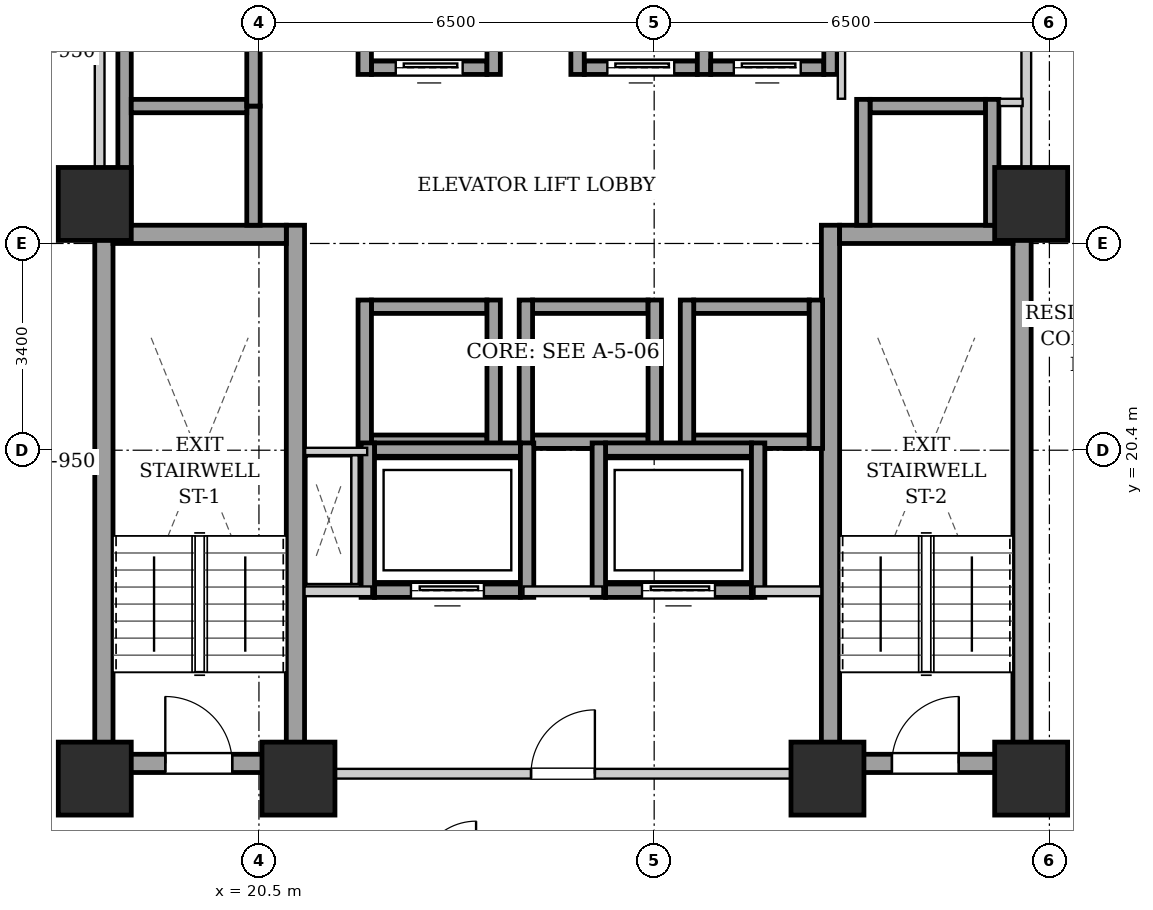
"""IFC4 building model, lengths in metres.
Left out: names, types, materials, properties, quantities, classifications, styles, units other than length and angle.
Written with IfcOpenShell. Run it as: python <this file> out.ifc"""

import sys

from ifc_helpers import new_model, si_unit, direction, frame, frame_2d, origin, origin_2d, place, context, subcontext, project, spatial, rectangle, extrude, element, fill, save


model = new_model("IFC4")
c1 = context("Model", 3, precision=1e-05, world=origin(), true_north=direction((0.0, 1.0)))
c2 = subcontext(c1, "Body", "Model", "MODEL_VIEW")
j1 = project(units=[si_unit("LENGTHUNIT", "METRE"), si_unit("PLANEANGLEUNIT", "RADIAN")], contexts=[c1])
p1 = place(None, origin())
s1 = spatial("IfcSite", under=j1, at=p1, CompositionType="ELEMENT")
p2 = place(p1, origin())
s2 = spatial("IfcBuilding", under=s1, at=p2, CompositionType="ELEMENT")
p3 = place(p2, frame((0.0, 0.0, 64.2)))
s3 = spatial("IfcBuildingStorey", under=s2, at=p3, CompositionType="ELEMENT", Elevation=64.2)
for number, where, z_axis, x_axis in (
    (1, (17.8, 15.0, 0.0), (0.0, 0.0, 1.0), (1.0, 0.0, 0.0)),
    (2, (21.15, 15.0, 0.0), (0.0, 0.0, 1.0), (1.0, 0.0, 0.0)),
    (3, (29.85, 15.0, 0.0), (0.0, 0.0, 1.0), (1.0, 0.0, 0.0)),
    (4, (33.2, 15.0, 0.0), (0.0, 0.0, 1.0), (1.0, 0.0, 0.0)),
    (5, (17.8, 24.45, 0.0), (0.0, 0.0, 1.0), (1.0, 0.0, 0.0)),
    (6, (33.2, 24.45, 0.0), (0.0, 0.0, 1.0), (1.0, 0.0, 0.0)),
):
    element("IfcColumn", number, at=place(p3, frame(where, z_axis=z_axis, x_axis=x_axis)), inside=s3, PredefinedType="COLUMN", context=c2, shape_type="SweptSolid", body=[
        extrude(rectangle(XDim=1.2, YDim=1.2, at=origin_2d()), origin(), (0.0, 0.0, 1.0), 3.2),
    ])
for number, where, z_axis, x_axis in (
    (7, (17.95, 15.1, 0.0), (0.0, 0.0, 1.0), (0.0, 1.0, 0.0)),
    (8, (21.1, 15.1, 0.0), (0.0, 0.0, 1.0), (0.0, 1.0, 0.0)),
):
    element("IfcWall", number, at=place(p3, frame(where, z_axis=z_axis, x_axis=x_axis)), inside=s3, PredefinedType="SHEAR", context=c2, shape_type="SweptSolid", body=[
        extrude(rectangle(XDim=9.0, YDim=0.3, at=frame_2d((4.5, 0.0))), origin(), (0.0, 0.0, 1.0), 2.94),
    ])
p4 = place(p3, frame((18.1, 23.95, 0.0), z_axis=(0.0, 0.0, 1.0), x_axis=(1.0, 0.0, 0.0)))
e9 = element("IfcWall", 9, at=p4, inside=s3, PredefinedType="SHEAR", context=c2, shape_type="SweptSolid", body=[
    extrude(rectangle(XDim=2.85, YDim=0.3, at=frame_2d((1.425, 0.0))), origin(), (0.0, 0.0, 1.0), 2.94),
])
p5 = place(p3, frame((18.1, 15.25, 0.0), z_axis=(0.0, 0.0, 1.0), x_axis=(1.0, 0.0, 0.0)))
e10 = element("IfcWall", 10, at=p5, inside=s3, PredefinedType="SHEAR", context=c2, shape_type="SweptSolid", body=[
    extrude(rectangle(XDim=2.85, YDim=0.3, at=frame_2d((1.425, 0.0))), origin(), (0.0, 0.0, 1.0), 2.94),
])
p6 = place(p5, frame((0.86, 0.0, 0.0)))
e11 = element("IfcOpeningElement", 11, at=p6, cuts=e10, PredefinedType="OPENING", context=c2, shape_type="SweptSolid", body=[
    extrude(rectangle(XDim=1.1, YDim=2.05, at=frame_2d((0.55, 1.025))), frame((0.0, 0.16, 0.0), z_axis=(0.0, -1.0, 0.0), x_axis=(1.0, 0.0, 0.0)), (0.0, 0.0, 1.0), 0.32),
])
for number, where, z_axis, x_axis in (
    (12, (29.9, 15.1, 0.0), (0.0, 0.0, 1.0), (0.0, 1.0, 0.0)),
    (13, (33.05, 15.1, 0.0), (0.0, 0.0, 1.0), (0.0, 1.0, 0.0)),
):
    element("IfcWall", number, at=place(p3, frame(where, z_axis=z_axis, x_axis=x_axis)), inside=s3, PredefinedType="SHEAR", context=c2, shape_type="SweptSolid", body=[
        extrude(rectangle(XDim=9.0, YDim=0.3, at=frame_2d((4.5, 0.0))), origin(), (0.0, 0.0, 1.0), 2.94),
    ])
p7 = place(p3, frame((30.05, 23.95, 0.0), z_axis=(0.0, 0.0, 1.0), x_axis=(1.0, 0.0, 0.0)))
e14 = element("IfcWall", 14, at=p7, inside=s3, PredefinedType="SHEAR", context=c2, shape_type="SweptSolid", body=[
    extrude(rectangle(XDim=2.85, YDim=0.3, at=frame_2d((1.425, 0.0))), origin(), (0.0, 0.0, 1.0), 2.94),
])
p8 = place(p3, frame((30.05, 15.25, 0.0), z_axis=(0.0, 0.0, 1.0), x_axis=(1.0, 0.0, 0.0)))
e15 = element("IfcWall", 15, at=p8, inside=s3, PredefinedType="SHEAR", context=c2, shape_type="SweptSolid", body=[
    extrude(rectangle(XDim=2.85, YDim=0.3, at=frame_2d((1.425, 0.0))), origin(), (0.0, 0.0, 1.0), 2.94),
])
p9 = place(p8, frame((0.86, 0.0, 0.0)))
e16 = element("IfcOpeningElement", 16, at=p9, cuts=e15, PredefinedType="OPENING", context=c2, shape_type="SweptSolid", body=[
    extrude(rectangle(XDim=1.1, YDim=2.05, at=frame_2d((0.55, 1.025))), frame((0.0, 0.16, 0.0), z_axis=(0.0, -1.0, 0.0), x_axis=(1.0, 0.0, 0.0)), (0.0, 0.0, 1.0), 0.32),
])
p10 = place(p3, frame((22.35, 26.69, 0.0), z_axis=(0.0, 0.0, 1.0), x_axis=(1.0, 0.0, 0.0)))
e17 = element("IfcWall", 17, at=p10, inside=s3, PredefinedType="SHEAR", context=c2, shape_type="SweptSolid", body=[
    extrude(rectangle(XDim=1.9, YDim=0.22, at=frame_2d((0.95, 0.0))), origin(), (0.0, 0.0, 1.0), 2.94),
])
p11 = place(p10, frame((0.4, 0.0, 0.0)))
e18 = element("IfcOpeningElement", 18, at=p11, cuts=e17, PredefinedType="OPENING", context=c2, shape_type="SweptSolid", body=[
    extrude(rectangle(XDim=1.1, YDim=2.15, at=frame_2d((0.55, 1.075))), frame((0.0, 0.12, 0.0), z_axis=(0.0, -1.0, 0.0), x_axis=(1.0, 0.0, 0.0)), (0.0, 0.0, 1.0), 0.24),
])
for number, where, z_axis, x_axis in (
    (19, (22.24, 26.58, 0.0), (0.0, 0.0, 1.0), (0.0, 1.0, 0.0)),
    (20, (24.36, 26.58, 0.0), (0.0, 0.0, 1.0), (0.0, 1.0, 0.0)),
):
    element("IfcWall", number, at=place(p3, frame(where, z_axis=z_axis, x_axis=x_axis)), inside=s3, PredefinedType="SHEAR", context=c2, shape_type="SweptSolid", body=[
        extrude(rectangle(XDim=2.44, YDim=0.22, at=frame_2d((1.22, 0.0))), origin(), (0.0, 0.0, 1.0), 2.94),
    ])
p12 = place(p3, frame((25.85, 26.69, 0.0), z_axis=(0.0, 0.0, 1.0), x_axis=(1.0, 0.0, 0.0)))
e21 = element("IfcWall", 21, at=p12, inside=s3, PredefinedType="SHEAR", context=c2, shape_type="SweptSolid", body=[
    extrude(rectangle(XDim=1.86, YDim=0.22, at=frame_2d((0.93, 0.0))), origin(), (0.0, 0.0, 1.0), 2.94),
])
p13 = place(p12, frame((0.38, 0.0, 0.0)))
e22 = element("IfcOpeningElement", 22, at=p13, cuts=e21, PredefinedType="OPENING", context=c2, shape_type="SweptSolid", body=[
    extrude(rectangle(XDim=1.1, YDim=2.15, at=frame_2d((0.55, 1.075))), frame((0.0, 0.12, 0.0), z_axis=(0.0, -1.0, 0.0), x_axis=(1.0, 0.0, 0.0)), (0.0, 0.0, 1.0), 0.24),
])
for number, where, z_axis, x_axis in (
    (23, (25.74, 26.58, 0.0), (0.0, 0.0, 1.0), (0.0, 1.0, 0.0)),
    (24, (27.82, 26.58, 0.0), (0.0, 0.0, 1.0), (0.0, 1.0, 0.0)),
):
    element("IfcWall", number, at=place(p3, frame(where, z_axis=z_axis, x_axis=x_axis)), inside=s3, PredefinedType="SHEAR", context=c2, shape_type="SweptSolid", body=[
        extrude(rectangle(XDim=2.44, YDim=0.22, at=frame_2d((1.22, 0.0))), origin(), (0.0, 0.0, 1.0), 2.94),
    ])
p14 = place(p3, frame((27.93, 26.69, 0.0), z_axis=(0.0, 0.0, 1.0), x_axis=(1.0, 0.0, 0.0)))
e25 = element("IfcWall", 25, at=p14, inside=s3, PredefinedType="SHEAR", context=c2, shape_type="SweptSolid", body=[
    extrude(rectangle(XDim=1.86, YDim=0.22, at=frame_2d((0.93, 0.0))), origin(), (0.0, 0.0, 1.0), 2.94),
])
p15 = place(p14, frame((0.38, 0.0, 0.0)))
e26 = element("IfcOpeningElement", 26, at=p15, cuts=e25, PredefinedType="OPENING", context=c2, shape_type="SweptSolid", body=[
    extrude(rectangle(XDim=1.1, YDim=2.15, at=frame_2d((0.55, 1.075))), frame((0.0, 0.12, 0.0), z_axis=(0.0, -1.0, 0.0), x_axis=(1.0, 0.0, 0.0)), (0.0, 0.0, 1.0), 0.24),
])
p16 = place(p3, frame((29.9, 26.58, 0.0), z_axis=(0.0, 0.0, 1.0), x_axis=(0.0, 1.0, 0.0)))
e27 = element("IfcWall", 27, at=p16, inside=s3, PredefinedType="SHEAR", context=c2, shape_type="SweptSolid", body=[
    extrude(rectangle(XDim=2.44, YDim=0.22, at=frame_2d((1.22, 0.0))), origin(), (0.0, 0.0, 1.0), 2.94),
])
for number, where, z_axis, x_axis in (
    (28, (22.35, 20.54, 0.0), (0.0, 0.0, 1.0), (1.0, 0.0, 0.0)),
    (29, (22.35, 22.76, 0.0), (0.0, 0.0, 1.0), (1.0, 0.0, 0.0)),
):
    element("IfcWall", number, at=place(p3, frame(where, z_axis=z_axis, x_axis=x_axis)), inside=s3, PredefinedType="SHEAR", context=c2, shape_type="SweptSolid", body=[
        extrude(rectangle(XDim=1.9, YDim=0.22, at=frame_2d((0.95, 0.0))), origin(), (0.0, 0.0, 1.0), 2.94),
    ])
for number, where, z_axis, x_axis in (
    (30, (22.24, 20.43, 0.0), (0.0, 0.0, 1.0), (0.0, 1.0, 0.0)),
    (31, (24.36, 20.43, 0.0), (0.0, 0.0, 1.0), (0.0, 1.0, 0.0)),
):
    element("IfcWall", number, at=place(p3, frame(where, z_axis=z_axis, x_axis=x_axis)), inside=s3, PredefinedType="SHEAR", context=c2, shape_type="SweptSolid", body=[
        extrude(rectangle(XDim=2.44, YDim=0.22, at=frame_2d((1.22, 0.0))), origin(), (0.0, 0.0, 1.0), 2.94),
    ])
for number, where, z_axis, x_axis in (
    (32, (25.0, 20.54, 0.0), (0.0, 0.0, 1.0), (1.0, 0.0, 0.0)),
    (33, (25.0, 22.76, 0.0), (0.0, 0.0, 1.0), (1.0, 0.0, 0.0)),
):
    element("IfcWall", number, at=place(p3, frame(where, z_axis=z_axis, x_axis=x_axis)), inside=s3, PredefinedType="SHEAR", context=c2, shape_type="SweptSolid", body=[
        extrude(rectangle(XDim=1.9, YDim=0.22, at=frame_2d((0.95, 0.0))), origin(), (0.0, 0.0, 1.0), 2.94),
    ])
for number, where, z_axis, x_axis in (
    (34, (24.89, 20.43, 0.0), (0.0, 0.0, 1.0), (0.0, 1.0, 0.0)),
    (35, (27.01, 20.43, 0.0), (0.0, 0.0, 1.0), (0.0, 1.0, 0.0)),
):
    element("IfcWall", number, at=place(p3, frame(where, z_axis=z_axis, x_axis=x_axis)), inside=s3, PredefinedType="SHEAR", context=c2, shape_type="SweptSolid", body=[
        extrude(rectangle(XDim=2.44, YDim=0.22, at=frame_2d((1.22, 0.0))), origin(), (0.0, 0.0, 1.0), 2.94),
    ])
for number, where, z_axis, x_axis in (
    (36, (27.65, 20.54, 0.0), (0.0, 0.0, 1.0), (1.0, 0.0, 0.0)),
    (37, (27.65, 22.76, 0.0), (0.0, 0.0, 1.0), (1.0, 0.0, 0.0)),
):
    element("IfcWall", number, at=place(p3, frame(where, z_axis=z_axis, x_axis=x_axis)), inside=s3, PredefinedType="SHEAR", context=c2, shape_type="SweptSolid", body=[
        extrude(rectangle(XDim=1.9, YDim=0.22, at=frame_2d((0.95, 0.0))), origin(), (0.0, 0.0, 1.0), 2.94),
    ])
for number, where, z_axis, x_axis in (
    (38, (27.54, 20.43, 0.0), (0.0, 0.0, 1.0), (0.0, 1.0, 0.0)),
    (39, (29.66, 20.43, 0.0), (0.0, 0.0, 1.0), (0.0, 1.0, 0.0)),
):
    element("IfcWall", number, at=place(p3, frame(where, z_axis=z_axis, x_axis=x_axis)), inside=s3, PredefinedType="SHEAR", context=c2, shape_type="SweptSolid", body=[
        extrude(rectangle(XDim=2.44, YDim=0.22, at=frame_2d((1.22, 0.0))), origin(), (0.0, 0.0, 1.0), 2.94),
    ])
p17 = place(p3, frame((18.29, 24.1, 0.0), z_axis=(0.0, 0.0, 1.0), x_axis=(0.0, 1.0, 0.0)))
e40 = element("IfcWall", 40, at=p17, inside=s3, PredefinedType="SHEAR", context=c2, shape_type="SweptSolid", body=[
    extrude(rectangle(XDim=4.14, YDim=0.22, at=frame_2d((2.07, 0.0))), origin(), (0.0, 0.0, 1.0), 2.94),
])
p18 = place(p3, frame((20.41, 24.1, 0.0), z_axis=(0.0, 0.0, 1.0), x_axis=(0.0, 1.0, 0.0)))
e41 = element("IfcWall", 41, at=p18, inside=s3, PredefinedType="SHEAR", context=c2, shape_type="SweptSolid", body=[
    extrude(rectangle(XDim=1.96, YDim=0.22, at=frame_2d((0.98, 0.0))), origin(), (0.0, 0.0, 1.0), 2.94),
])
p19 = place(p3, frame((18.4, 26.06, 0.0), z_axis=(0.0, 0.0, 1.0), x_axis=(1.0, 0.0, 0.0)))
e42 = element("IfcWall", 42, at=p19, inside=s3, PredefinedType="SHEAR", context=c2, shape_type="SweptSolid", body=[
    extrude(rectangle(XDim=1.9, YDim=0.22, at=frame_2d((0.95, 0.0))), origin(), (0.0, 0.0, 1.0), 2.94),
])
p20 = place(p3, frame((20.41, 26.06, 0.0), z_axis=(0.0, 0.0, 1.0), x_axis=(0.0, 1.0, 0.0)))
e43 = element("IfcWall", 43, at=p20, inside=s3, PredefinedType="SHEAR", context=c2, shape_type="SweptSolid", body=[
    extrude(rectangle(XDim=2.18, YDim=0.22, at=frame_2d((1.09, 0.0))), origin(), (0.0, 0.0, 1.0), 2.94),
])
p21 = place(p3, frame((30.55, 26.06, 0.0), z_axis=(0.0, 0.0, 1.0), x_axis=(1.0, 0.0, 0.0)))
e44 = element("IfcWall", 44, at=p21, inside=s3, PredefinedType="SHEAR", context=c2, shape_type="SweptSolid", body=[
    extrude(rectangle(XDim=1.9, YDim=0.22, at=frame_2d((0.95, 0.0))), origin(), (0.0, 0.0, 1.0), 2.94),
])
for number, where, z_axis, x_axis in (
    (45, (30.44, 24.1, 0.0), (0.0, 0.0, 1.0), (0.0, 1.0, 0.0)),
    (46, (32.56, 24.1, 0.0), (0.0, 0.0, 1.0), (0.0, 1.0, 0.0)),
):
    element("IfcWall", number, at=place(p3, frame(where, z_axis=z_axis, x_axis=x_axis)), inside=s3, PredefinedType="SHEAR", context=c2, shape_type="SweptSolid", body=[
        extrude(rectangle(XDim=2.07, YDim=0.22, at=frame_2d((1.035, 0.0))), origin(), (0.0, 0.0, 1.0), 2.94),
    ])
p22 = place(p3, frame((22.4, 18.09, 0.0), z_axis=(0.0, 0.0, 1.0), x_axis=(1.0, 0.0, 0.0)))
e47 = element("IfcWall", 47, at=p22, inside=s3, PredefinedType="SHEAR", context=c2, shape_type="SweptSolid", body=[
    extrude(rectangle(XDim=2.4, YDim=0.22, at=frame_2d((1.2, 0.0))), origin(), (0.0, 0.0, 1.0), 2.94),
])
p23 = place(p22, frame((0.6, 0.0, 0.0)))
e48 = element("IfcOpeningElement", 48, at=p23, cuts=e47, PredefinedType="OPENING", context=c2, shape_type="SweptSolid", body=[
    extrude(rectangle(XDim=1.2, YDim=2.15, at=frame_2d((0.6, 1.075))), frame((0.0, 0.12, 0.0), z_axis=(0.0, -1.0, 0.0), x_axis=(1.0, 0.0, 0.0)), (0.0, 0.0, 1.0), 0.24),
])
p24 = place(p3, frame((22.4, 20.41, 0.0), z_axis=(0.0, 0.0, 1.0), x_axis=(1.0, 0.0, 0.0)))
e49 = element("IfcWall", 49, at=p24, inside=s3, PredefinedType="SHEAR", context=c2, shape_type="SweptSolid", body=[
    extrude(rectangle(XDim=2.4, YDim=0.22, at=frame_2d((1.2, 0.0))), origin(), (0.0, 0.0, 1.0), 2.94),
])
for number, where, z_axis, x_axis in (
    (50, (22.29, 17.98, 0.0), (0.0, 0.0, 1.0), (0.0, 1.0, 0.0)),
    (51, (24.91, 17.98, 0.0), (0.0, 0.0, 1.0), (0.0, 1.0, 0.0)),
):
    element("IfcWall", number, at=place(p3, frame(where, z_axis=z_axis, x_axis=x_axis)), inside=s3, PredefinedType="SHEAR", context=c2, shape_type="SweptSolid", body=[
        extrude(rectangle(XDim=2.54, YDim=0.22, at=frame_2d((1.27, 0.0))), origin(), (0.0, 0.0, 1.0), 2.94),
    ])
p25 = place(p3, frame((26.2, 18.09, 0.0), z_axis=(0.0, 0.0, 1.0), x_axis=(1.0, 0.0, 0.0)))
e52 = element("IfcWall", 52, at=p25, inside=s3, PredefinedType="SHEAR", context=c2, shape_type="SweptSolid", body=[
    extrude(rectangle(XDim=2.4, YDim=0.22, at=frame_2d((1.2, 0.0))), origin(), (0.0, 0.0, 1.0), 2.94),
])
p26 = place(p25, frame((0.6, 0.0, 0.0)))
e53 = element("IfcOpeningElement", 53, at=p26, cuts=e52, PredefinedType="OPENING", context=c2, shape_type="SweptSolid", body=[
    extrude(rectangle(XDim=1.2, YDim=2.15, at=frame_2d((0.6, 1.075))), frame((0.0, 0.12, 0.0), z_axis=(0.0, -1.0, 0.0), x_axis=(1.0, 0.0, 0.0)), (0.0, 0.0, 1.0), 0.24),
])
p27 = place(p3, frame((26.2, 20.41, 0.0), z_axis=(0.0, 0.0, 1.0), x_axis=(1.0, 0.0, 0.0)))
e54 = element("IfcWall", 54, at=p27, inside=s3, PredefinedType="SHEAR", context=c2, shape_type="SweptSolid", body=[
    extrude(rectangle(XDim=2.4, YDim=0.22, at=frame_2d((1.2, 0.0))), origin(), (0.0, 0.0, 1.0), 2.94),
])
for number, where, z_axis, x_axis in (
    (55, (26.09, 17.98, 0.0), (0.0, 0.0, 1.0), (0.0, 1.0, 0.0)),
    (56, (28.71, 17.98, 0.0), (0.0, 0.0, 1.0), (0.0, 1.0, 0.0)),
):
    element("IfcWall", number, at=place(p3, frame(where, z_axis=z_axis, x_axis=x_axis)), inside=s3, PredefinedType="SHEAR", context=c2, shape_type="SweptSolid", body=[
        extrude(rectangle(XDim=2.54, YDim=0.22, at=frame_2d((1.27, 0.0))), origin(), (0.0, 0.0, 1.0), 2.94),
    ])
p28 = place(p3, frame((21.25, 15.08, 0.0), z_axis=(0.0, 0.0, 1.0), x_axis=(1.0, 0.0, 0.0)))
e57 = element("IfcWall", 57, at=p28, inside=s3, PredefinedType="PARTITIONING", context=c2, shape_type="SweptSolid", body=[
    extrude(rectangle(XDim=8.5, YDim=0.16, at=frame_2d((4.25, 0.0))), origin(), (0.0, 0.0, 1.0), 2.232),
])
p29 = place(p28, frame((3.725, 0.0, 0.0)))
e58 = element("IfcOpeningElement", 58, at=p29, cuts=e57, PredefinedType="OPENING", context=c2, shape_type="SweptSolid", body=[
    extrude(rectangle(XDim=1.05, YDim=2.05, at=frame_2d((0.525, 1.025))), frame((0.0, 0.09, 0.0), z_axis=(0.0, -1.0, 0.0), x_axis=(1.0, 0.0, 0.0)), (0.0, 0.0, 1.0), 0.18),
])
p30 = place(p3, frame((21.25, 18.08, 0.0), z_axis=(0.0, 0.0, 1.0), x_axis=(1.0, 0.0, 0.0)))
e59 = element("IfcWall", 59, at=p30, inside=s3, PredefinedType="PARTITIONING", context=c2, shape_type="SweptSolid", body=[
    extrude(rectangle(XDim=1.1, YDim=0.16, at=frame_2d((0.55, 0.0))), origin(), (0.0, 0.0, 1.0), 2.94),
])
p31 = place(p3, frame((24.85, 18.08, 0.0), z_axis=(0.0, 0.0, 1.0), x_axis=(1.0, 0.0, 0.0)))
e60 = element("IfcWall", 60, at=p31, inside=s3, PredefinedType="PARTITIONING", context=c2, shape_type="SweptSolid", body=[
    extrude(rectangle(XDim=1.3, YDim=0.16, at=frame_2d((0.65, 0.0))), origin(), (0.0, 0.0, 1.0), 2.94),
])
p32 = place(p3, frame((28.65, 18.08, 0.0), z_axis=(0.0, 0.0, 1.0), x_axis=(1.0, 0.0, 0.0)))
e61 = element("IfcWall", 61, at=p32, inside=s3, PredefinedType="PARTITIONING", context=c2, shape_type="SweptSolid", body=[
    extrude(rectangle(XDim=1.1, YDim=0.16, at=frame_2d((0.55, 0.0))), origin(), (0.0, 0.0, 1.0), 2.94),
])
for number, where, z_axis, x_axis in (
    (62, (17.88, 24.12, 0.0), (0.0, 0.0, 1.0), (0.0, 1.0, 0.0)),
    (63, (33.12, 24.12, 0.0), (0.0, 0.0, 1.0), (0.0, 1.0, 0.0)),
):
    element("IfcWall", number, at=place(p3, frame(where, z_axis=z_axis, x_axis=x_axis)), inside=s3, PredefinedType="PARTITIONING", context=c2, shape_type="SweptSolid", body=[
        extrude(rectangle(XDim=4.76, YDim=0.16, at=frame_2d((2.38, 0.0))), origin(), (0.0, 0.0, 1.0), 2.94),
    ])
p33 = place(p3, frame((22.08, 18.2, 0.0), z_axis=(0.0, 0.0, 1.0), x_axis=(0.0, 1.0, 0.0)))
e64 = element("IfcWall", 64, at=p33, inside=s3, PredefinedType="PARTITIONING", context=c2, shape_type="SweptSolid", body=[
    extrude(rectangle(XDim=2.12, YDim=0.12, at=frame_2d((1.06, 0.0))), origin(), (0.0, 0.0, 1.0), 2.94),
])
p34 = place(p3, frame((22.28, 20.38, 0.0), z_axis=(0.0, 0.0, 1.0), x_axis=(-1.0, 0.0, 0.0)))
e65 = element("IfcWall", 65, at=p34, inside=s3, PredefinedType="PARTITIONING", context=c2, shape_type="SweptSolid", body=[
    extrude(rectangle(XDim=1.02, YDim=0.12, at=frame_2d((0.51, 0.0))), origin(), (0.0, 0.0, 1.0), 2.94),
])
p35 = place(p3, frame((30.08, 26.18, 0.0), z_axis=(0.0, 0.0, 1.0), x_axis=(0.0, 1.0, 0.0)))
e66 = element("IfcWall", 66, at=p35, inside=s3, PredefinedType="PARTITIONING", context=c2, shape_type="SweptSolid", body=[
    extrude(rectangle(XDim=2.68, YDim=0.12, at=frame_2d((1.34, 0.0))), origin(), (0.0, 0.0, 1.0), 2.94),
])
p36 = place(p3, frame((32.68, 26.12, 0.0), z_axis=(0.0, 0.0, 1.0), x_axis=(1.0, 0.0, 0.0)))
e67 = element("IfcWall", 67, at=p36, inside=s3, PredefinedType="PARTITIONING", context=c2, shape_type="SweptSolid", body=[
    extrude(rectangle(XDim=0.38, YDim=0.12, at=frame_2d((0.19, 0.0))), origin(), (0.0, 0.0, 1.0), 2.94),
])
p37 = place(p6, origin())
e68 = element("IfcDoor", 68, at=p37, inside=s3, OperationType="SINGLE_SWING_LEFT", PredefinedType="DOOR", context=c2, shape_type="SweptSolid", body=[
    extrude(rectangle(XDim=1.1, YDim=2.05, at=frame_2d((0.55, 1.025))), frame((0.0, 0.025, 0.0), z_axis=(0.0, -1.0, 0.0), x_axis=(1.0, 0.0, 0.0)), (0.0, 0.0, 1.0), 0.05),
])
fill(e11, e68)
p38 = place(p9, origin())
e69 = element("IfcDoor", 69, at=p38, inside=s3, OperationType="SINGLE_SWING_RIGHT", PredefinedType="DOOR", context=c2, shape_type="SweptSolid", body=[
    extrude(rectangle(XDim=1.1, YDim=2.05, at=frame_2d((0.55, 1.025))), frame((0.0, 0.025, 0.0), z_axis=(0.0, -1.0, 0.0), x_axis=(1.0, 0.0, 0.0)), (0.0, 0.0, 1.0), 0.05),
])
fill(e16, e69)
p39 = place(p11, origin())
e70 = element("IfcDoor", 70, at=p39, inside=s3, OperationType="SLIDING_TO_LEFT", PredefinedType="DOOR", context=c2, shape_type="SweptSolid", body=[
    extrude(rectangle(XDim=1.1, YDim=2.15, at=frame_2d((0.55, 1.075))), frame((0.0, 0.025, 0.0), z_axis=(0.0, -1.0, 0.0), x_axis=(1.0, 0.0, 0.0)), (0.0, 0.0, 1.0), 0.05),
])
fill(e18, e70)
p40 = place(p13, origin())
e71 = element("IfcDoor", 71, at=p40, inside=s3, OperationType="SLIDING_TO_LEFT", PredefinedType="DOOR", context=c2, shape_type="SweptSolid", body=[
    extrude(rectangle(XDim=1.1, YDim=2.15, at=frame_2d((0.55, 1.075))), frame((0.0, 0.025, 0.0), z_axis=(0.0, -1.0, 0.0), x_axis=(1.0, 0.0, 0.0)), (0.0, 0.0, 1.0), 0.05),
])
fill(e22, e71)
p41 = place(p15, origin())
e72 = element("IfcDoor", 72, at=p41, inside=s3, OperationType="SLIDING_TO_LEFT", PredefinedType="DOOR", context=c2, shape_type="SweptSolid", body=[
    extrude(rectangle(XDim=1.1, YDim=2.15, at=frame_2d((0.55, 1.075))), frame((0.0, 0.025, 0.0), z_axis=(0.0, -1.0, 0.0), x_axis=(1.0, 0.0, 0.0)), (0.0, 0.0, 1.0), 0.05),
])
fill(e26, e72)
p42 = place(p23, origin())
e73 = element("IfcDoor", 73, at=p42, inside=s3, OperationType="SLIDING_TO_LEFT", PredefinedType="DOOR", context=c2, shape_type="SweptSolid", body=[
    extrude(rectangle(XDim=1.2, YDim=2.15, at=frame_2d((0.6, 1.075))), frame((0.0, 0.025, 0.0), z_axis=(0.0, -1.0, 0.0), x_axis=(1.0, 0.0, 0.0)), (0.0, 0.0, 1.0), 0.05),
])
fill(e48, e73)
p43 = place(p26, origin())
e74 = element("IfcDoor", 74, at=p43, inside=s3, OperationType="SLIDING_TO_LEFT", PredefinedType="DOOR", context=c2, shape_type="SweptSolid", body=[
    extrude(rectangle(XDim=1.2, YDim=2.15, at=frame_2d((0.6, 1.075))), frame((0.0, 0.025, 0.0), z_axis=(0.0, -1.0, 0.0), x_axis=(1.0, 0.0, 0.0)), (0.0, 0.0, 1.0), 0.05),
])
fill(e53, e74)
p44 = place(p29, origin())
e75 = element("IfcDoor", 75, at=p44, inside=s3, OperationType="SINGLE_SWING_RIGHT", PredefinedType="DOOR", context=c2, shape_type="SweptSolid", body=[
    extrude(rectangle(XDim=1.05, YDim=2.05, at=frame_2d((0.525, 1.025))), frame((0.0, 0.025, 0.0), z_axis=(0.0, -1.0, 0.0), x_axis=(1.0, 0.0, 0.0)), (0.0, 0.0, 1.0), 0.05),
])
fill(e58, e75)
save(model, sys.argv[1])
